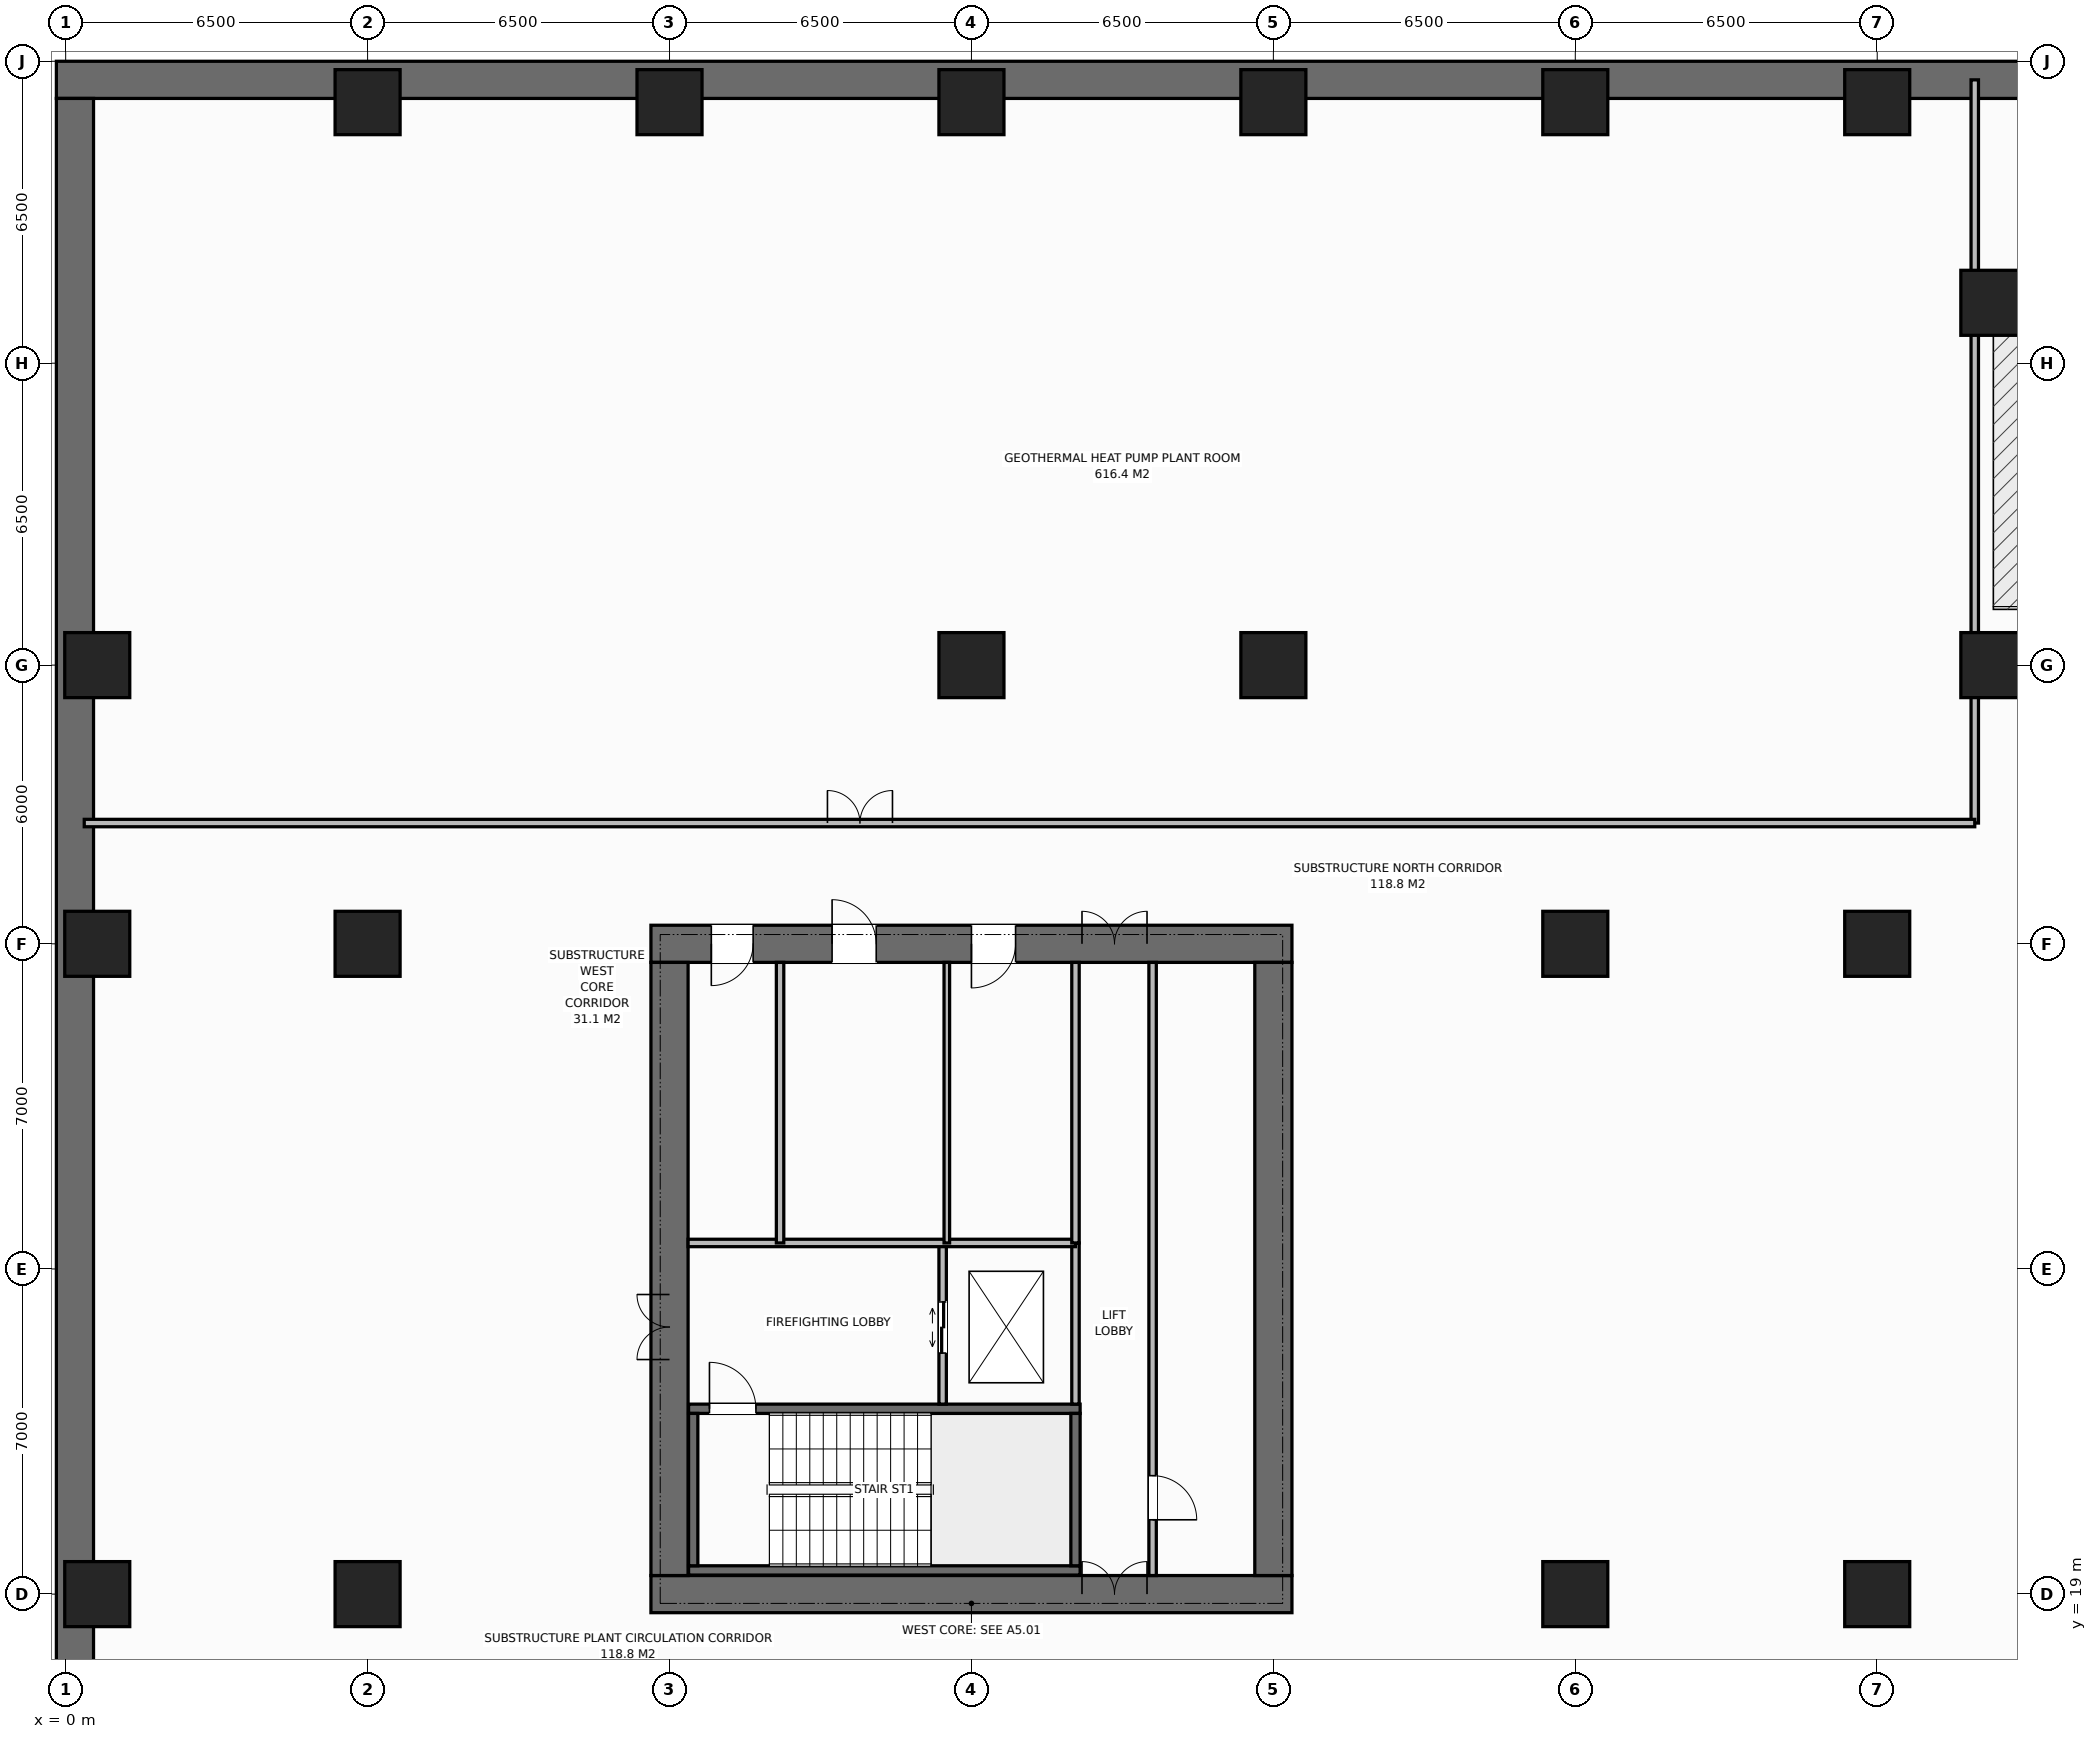
"""IFC4 building model, lengths in metres.
Left out: names, types, materials, properties, quantities, classifications, styles, units other than length and angle.
Written with IfcOpenShell. Run it as: python <this file> out.ifc"""

import sys

from ifc_helpers import new_model, si_unit, direction, frame, frame_2d, origin, origin_2d, place, context, subcontext, project, spatial, rectangle, extrude, element, fill, save


model = new_model("IFC4")
c1 = context("Model", 3, precision=1e-05, world=origin(), true_north=direction((0.0, 1.0)))
c2 = subcontext(c1, "Body", "Model", "MODEL_VIEW")
j1 = project(units=[si_unit("LENGTHUNIT", "METRE"), si_unit("PLANEANGLEUNIT", "RADIAN")], contexts=[c1])
p1 = place(None, origin())
s1 = spatial("IfcSite", under=j1, at=p1, CompositionType="ELEMENT")
p2 = place(p1, origin())
s2 = spatial("IfcBuilding", under=s1, at=p2, CompositionType="ELEMENT")
p3 = place(p2, frame((0.0, 0.0, -13.5)))
s3 = spatial("IfcBuildingStorey", under=s2, at=p3, CompositionType="ELEMENT", Elevation=-13.5)
p4 = place(p3, frame((78.2, 51.6, 0.0), z_axis=(0.0, 0.0, 1.0), x_axis=(-1.0, 0.0, 0.0)))
e1 = element("IfcWall", 1, at=p4, inside=s3, PredefinedType="USERDEFINED", context=c2, shape_type="SweptSolid", body=[
    extrude(rectangle(XDim=78.4, YDim=0.8, at=frame_2d((39.2, 0.0))), origin(), (0.0, 0.0, 1.0), 4.2),
])
p5 = place(p3, frame((0.2, 51.2, 0.0), z_axis=(0.0, 0.0, 1.0), x_axis=(0.0, -1.0, 0.0)))
e2 = element("IfcWall", 2, at=p5, inside=s3, PredefinedType="USERDEFINED", context=c2, shape_type="SweptSolid", body=[
    extrude(rectangle(XDim=50.4, YDim=0.8, at=frame_2d((25.2, 0.0))), origin(), (0.0, 0.0, 1.0), 4.2),
])
p6 = place(p3, frame((12.6, 19.0, 0.0), z_axis=(0.0, 0.0, 1.0), x_axis=(1.0, 0.0, 0.0)))
e3 = element("IfcWall", 3, at=p6, inside=s3, PredefinedType="SHEAR", context=c2, shape_type="SweptSolid", body=[
    extrude(rectangle(XDim=13.8, YDim=0.8, at=frame_2d((6.9, 0.0))), origin(), (0.0, 0.0, 1.0), 4.5),
])
p7 = place(p6, frame((9.28, 0.0, 0.0)))
e4 = element("IfcOpeningElement", 4, at=p7, cuts=e3, PredefinedType="OPENING", context=c2, shape_type="SweptSolid", body=[
    extrude(rectangle(XDim=1.4, YDim=2.2, at=frame_2d((0.7, 1.1))), frame((0.0, 0.41, 0.0), z_axis=(0.0, -1.0, 0.0), x_axis=(1.0, 0.0, 0.0)), (0.0, 0.0, 1.0), 0.82),
])
p8 = place(p3, frame((12.6, 33.0, 0.0), z_axis=(0.0, 0.0, 1.0), x_axis=(1.0, 0.0, 0.0)))
e5 = element("IfcWall", 5, at=p8, inside=s3, PredefinedType="SHEAR", context=c2, shape_type="SweptSolid", body=[
    extrude(rectangle(XDim=13.8, YDim=0.8, at=frame_2d((6.9, 0.0))), origin(), (0.0, 0.0, 1.0), 4.5),
])
p9 = place(p8, frame((1.3, 0.0, 0.0)))
e6 = element("IfcOpeningElement", 6, at=p9, cuts=e5, PredefinedType="OPENING", context=c2, shape_type="SweptSolid", body=[
    extrude(rectangle(XDim=0.9, YDim=2.15, at=frame_2d((0.45, 1.075))), frame((0.0, 0.41, 0.0), z_axis=(0.0, -1.0, 0.0), x_axis=(1.0, 0.0, 0.0)), (0.0, 0.0, 1.0), 0.82),
])
p10 = place(p8, frame((3.9, 0.0, 0.0)))
e7 = element("IfcOpeningElement", 7, at=p10, cuts=e5, PredefinedType="OPENING", context=c2, shape_type="SweptSolid", body=[
    extrude(rectangle(XDim=0.95, YDim=2.15, at=frame_2d((0.475, 1.075))), frame((0.0, 0.41, 0.0), z_axis=(0.0, -1.0, 0.0), x_axis=(1.0, 0.0, 0.0)), (0.0, 0.0, 1.0), 0.82),
])
p11 = place(p8, frame((6.9, 0.0, 0.0)))
e8 = element("IfcOpeningElement", 8, at=p11, cuts=e5, PredefinedType="OPENING", context=c2, shape_type="SweptSolid", body=[
    extrude(rectangle(XDim=0.95, YDim=2.15, at=frame_2d((0.475, 1.075))), frame((0.0, 0.41, 0.0), z_axis=(0.0, -1.0, 0.0), x_axis=(1.0, 0.0, 0.0)), (0.0, 0.0, 1.0), 0.82),
])
p12 = place(p8, frame((9.28, 0.0, 0.0)))
e9 = element("IfcOpeningElement", 9, at=p12, cuts=e5, PredefinedType="OPENING", context=c2, shape_type="SweptSolid", body=[
    extrude(rectangle(XDim=1.4, YDim=2.2, at=frame_2d((0.7, 1.1))), frame((0.0, 0.41, 0.0), z_axis=(0.0, -1.0, 0.0), x_axis=(1.0, 0.0, 0.0)), (0.0, 0.0, 1.0), 0.82),
])
p13 = place(p3, frame((13.0, 19.4, 0.0), z_axis=(0.0, 0.0, 1.0), x_axis=(0.0, 1.0, 0.0)))
e10 = element("IfcWall", 10, at=p13, inside=s3, PredefinedType="SHEAR", context=c2, shape_type="SweptSolid", body=[
    extrude(rectangle(XDim=13.2, YDim=0.8, at=frame_2d((6.6, 0.0))), origin(), (0.0, 0.0, 1.0), 4.5),
])
p14 = place(p13, frame((4.65, 0.0, 0.0)))
e11 = element("IfcOpeningElement", 11, at=p14, cuts=e10, PredefinedType="OPENING", context=c2, shape_type="SweptSolid", body=[
    extrude(rectangle(XDim=1.4, YDim=2.2, at=frame_2d((0.7, 1.1))), frame((0.0, 0.41, 0.0), z_axis=(0.0, -1.0, 0.0), x_axis=(1.0, 0.0, 0.0)), (0.0, 0.0, 1.0), 0.82),
])
p15 = place(p3, frame((26.0, 19.4, 0.0), z_axis=(0.0, 0.0, 1.0), x_axis=(0.0, 1.0, 0.0)))
e12 = element("IfcWall", 12, at=p15, inside=s3, PredefinedType="SHEAR", context=c2, shape_type="SweptSolid", body=[
    extrude(rectangle(XDim=13.2, YDim=0.8, at=frame_2d((6.6, 0.0))), origin(), (0.0, 0.0, 1.0), 4.5),
])
p16 = place(p3, frame((13.41, 19.51, 0.0), z_axis=(0.0, 0.0, 1.0), x_axis=(1.0, 0.0, 0.0)))
e13 = element("IfcWall", 13, at=p16, inside=s3, PredefinedType="SHEAR", context=c2, shape_type="SweptSolid", body=[
    extrude(rectangle(XDim=8.43, YDim=0.2, at=frame_2d((4.215, 0.0))), origin(), (0.0, 0.0, 1.0), 4.5),
])
p17 = place(p3, frame((13.41, 22.99, 0.0), z_axis=(0.0, 0.0, 1.0), x_axis=(1.0, 0.0, 0.0)))
e14 = element("IfcWall", 14, at=p17, inside=s3, PredefinedType="SHEAR", context=c2, shape_type="SweptSolid", body=[
    extrude(rectangle(XDim=8.43, YDim=0.2, at=frame_2d((4.215, 0.0))), origin(), (0.0, 0.0, 1.0), 4.5),
])
p18 = place(p17, frame((0.45, 0.0, 0.0)))
e15 = element("IfcOpeningElement", 15, at=p18, cuts=e14, PredefinedType="OPENING", context=c2, shape_type="SweptSolid", body=[
    extrude(rectangle(XDim=1.0, YDim=2.15, at=frame_2d((0.5, 1.075))), frame((0.0, 0.11, 0.0), z_axis=(0.0, -1.0, 0.0), x_axis=(1.0, 0.0, 0.0)), (0.0, 0.0, 1.0), 0.22),
])
for number, where, z_axis, x_axis in (
    (16, (13.51, 19.61, 0.0), (0.0, 0.0, 1.0), (0.0, 1.0, 0.0)),
    (17, (21.74, 19.61, 0.0), (0.0, 0.0, 1.0), (0.0, 1.0, 0.0)),
):
    element("IfcWall", number, at=place(p3, frame(where, z_axis=z_axis, x_axis=x_axis)), inside=s3, PredefinedType="SHEAR", context=c2, shape_type="SweptSolid", body=[
        extrude(rectangle(XDim=3.28, YDim=0.2, at=frame_2d((1.64, 0.0))), origin(), (0.0, 0.0, 1.0), 4.5),
    ])
for number, where, z_axis, x_axis in (
    (18, (19.5, 39.0, 0.0), (0.0, 0.0, 1.0), (1.0, 0.0, 0.0)),
    (19, (6.5, 19.0, 0.0), (0.0, 0.0, 1.0), (1.0, 0.0, 0.0)),
    (20, (6.5, 33.0, 0.0), (0.0, 0.0, 1.0), (1.0, 0.0, 0.0)),
    (21, (32.5, 19.0, 0.0), (0.0, 0.0, 1.0), (1.0, 0.0, 0.0)),
    (22, (32.5, 33.0, 0.0), (0.0, 0.0, 1.0), (1.0, 0.0, 0.0)),
    (23, (39.0, 19.0, 0.0), (0.0, 0.0, 1.0), (1.0, 0.0, 0.0)),
    (24, (39.0, 33.0, 0.0), (0.0, 0.0, 1.0), (1.0, 0.0, 0.0)),
    (25, (41.5, 39.0, 0.0), (0.0, 0.0, 1.0), (1.0, 0.0, 0.0)),
    (26, (41.5, 46.8, 0.0), (0.0, 0.0, 1.0), (1.0, 0.0, 0.0)),
    (27, (26.0, 39.0, 0.0), (0.0, 0.0, 1.0), (1.0, 0.0, 0.0)),
    (28, (6.5, 51.12, 0.0), (0.0, 0.0, 1.0), (1.0, 0.0, 0.0)),
    (29, (13.0, 51.12, 0.0), (0.0, 0.0, 1.0), (1.0, 0.0, 0.0)),
    (30, (19.5, 51.12, 0.0), (0.0, 0.0, 1.0), (1.0, 0.0, 0.0)),
    (31, (26.0, 51.12, 0.0), (0.0, 0.0, 1.0), (1.0, 0.0, 0.0)),
    (32, (32.5, 51.12, 0.0), (0.0, 0.0, 1.0), (1.0, 0.0, 0.0)),
    (33, (39.0, 51.12, 0.0), (0.0, 0.0, 1.0), (1.0, 0.0, 0.0)),
    (34, (0.68, 19.0, 0.0), (0.0, 0.0, 1.0), (1.0, 0.0, 0.0)),
    (35, (0.68, 33.0, 0.0), (0.0, 0.0, 1.0), (1.0, 0.0, 0.0)),
    (36, (0.68, 39.0, 0.0), (0.0, 0.0, 1.0), (1.0, 0.0, 0.0)),
):
    element("IfcColumn", number, at=place(p3, frame(where, z_axis=z_axis, x_axis=x_axis)), inside=s3, PredefinedType="COLUMN", context=c2, shape_type="SweptSolid", body=[
        extrude(rectangle(XDim=1.4, YDim=1.4, at=origin_2d()), origin(), (0.0, 0.0, 1.0), 4.5),
    ])
p19 = place(p3, frame((21.74, 23.09, 0.0), z_axis=(0.0, 0.0, 1.0), x_axis=(0.0, 1.0, 0.0)))
e37 = element("IfcWall", 37, at=p19, inside=s3, PredefinedType="STANDARD", context=c2, shape_type="SweptSolid", body=[
    extrude(rectangle(XDim=3.47, YDim=0.16, at=frame_2d((1.735, 0.0))), origin(), (0.0, 0.0, 1.0), 4.2),
])
p20 = place(p3, frame((18.88, 23.09, 0.0), z_axis=(0.0, 0.0, 1.0), x_axis=(0.0, 1.0, 0.0)))
e38 = element("IfcWall", 38, at=p20, inside=s3, PredefinedType="STANDARD", context=c2, shape_type="SweptSolid", body=[
    extrude(rectangle(XDim=3.47, YDim=0.16, at=frame_2d((1.735, 0.0))), origin(), (0.0, 0.0, 1.0), 4.2),
])
p21 = place(p20, frame((1.1, 0.0, 0.0)))
e39 = element("IfcOpeningElement", 39, at=p21, cuts=e38, PredefinedType="OPENING", context=c2, shape_type="SweptSolid", body=[
    extrude(rectangle(XDim=1.1, YDim=2.2, at=frame_2d((0.55, 1.1))), frame((0.0, 0.09, 0.0), z_axis=(0.0, -1.0, 0.0), x_axis=(1.0, 0.0, 0.0)), (0.0, 0.0, 1.0), 0.18),
])
p22 = place(p3, frame((13.4, 26.56, 0.0), z_axis=(0.0, 0.0, 1.0), x_axis=(1.0, 0.0, 0.0)))
e40 = element("IfcWall", 40, at=p22, inside=s3, PredefinedType="STANDARD", context=c2, shape_type="SweptSolid", body=[
    extrude(rectangle(XDim=8.34, YDim=0.16, at=frame_2d((4.17, 0.0))), origin(), (0.0, 0.0, 1.0), 4.2),
])
p23 = place(p3, frame((15.38, 26.56, 0.0), z_axis=(0.0, 0.0, 1.0), x_axis=(0.0, 1.0, 0.0)))
e41 = element("IfcWall", 41, at=p23, inside=s3, PredefinedType="STANDARD", context=c2, shape_type="SweptSolid", body=[
    extrude(rectangle(XDim=6.04, YDim=0.16, at=frame_2d((3.02, 0.0))), origin(), (0.0, 0.0, 1.0), 4.2),
])
p24 = place(p3, frame((18.97, 26.56, 0.0), z_axis=(0.0, 0.0, 1.0), x_axis=(0.0, 1.0, 0.0)))
e42 = element("IfcWall", 42, at=p24, inside=s3, PredefinedType="PARTITIONING", context=c2, shape_type="SweptSolid", body=[
    extrude(rectangle(XDim=6.04, YDim=0.12, at=frame_2d((3.02, 0.0))), origin(), (0.0, 0.0, 1.0), 4.2),
])
p25 = place(p3, frame((21.74, 26.56, 0.0), z_axis=(0.0, 0.0, 1.0), x_axis=(0.0, 1.0, 0.0)))
e43 = element("IfcWall", 43, at=p25, inside=s3, PredefinedType="STANDARD", context=c2, shape_type="SweptSolid", body=[
    extrude(rectangle(XDim=6.04, YDim=0.16, at=frame_2d((3.02, 0.0))), origin(), (0.0, 0.0, 1.0), 4.2),
])
p26 = place(p3, frame((23.4, 19.4, 0.0), z_axis=(0.0, 0.0, 1.0), x_axis=(0.0, 1.0, 0.0)))
e44 = element("IfcWall", 44, at=p26, inside=s3, PredefinedType="STANDARD", context=c2, shape_type="SweptSolid", body=[
    extrude(rectangle(XDim=13.2, YDim=0.16, at=frame_2d((6.6, 0.0))), origin(), (0.0, 0.0, 1.0), 4.2),
])
p27 = place(p26, frame((1.2, 0.0, 0.0)))
e45 = element("IfcOpeningElement", 45, at=p27, cuts=e44, PredefinedType="OPENING", context=c2, shape_type="SweptSolid", body=[
    extrude(rectangle(XDim=0.95, YDim=2.15, at=frame_2d((0.475, 1.075))), frame((0.0, 0.09, 0.0), z_axis=(0.0, -1.0, 0.0), x_axis=(1.0, 0.0, 0.0)), (0.0, 0.0, 1.0), 0.18),
])
p28 = place(p3, frame((41.1, 35.6, 0.0), z_axis=(0.0, 0.0, 1.0), x_axis=(0.0, 1.0, 0.0)))
e46 = element("IfcWall", 46, at=p28, inside=s3, PredefinedType="STANDARD", context=c2, shape_type="SweptSolid", body=[
    extrude(rectangle(XDim=16.0, YDim=0.16, at=frame_2d((8.0, 0.0))), origin(), (0.0, 0.0, 1.0), 4.2),
])
p29 = place(p3, frame((0.4, 35.6, 0.0), z_axis=(0.0, 0.0, 1.0), x_axis=(1.0, 0.0, 0.0)))
e47 = element("IfcWall", 47, at=p29, inside=s3, PredefinedType="STANDARD", context=c2, shape_type="SweptSolid", body=[
    extrude(rectangle(XDim=40.7, YDim=0.16, at=frame_2d((20.35, 0.0))), origin(), (0.0, 0.0, 1.0), 4.2),
])
p30 = place(p29, frame((16.0, 0.0, 0.0)))
e48 = element("IfcOpeningElement", 48, at=p30, cuts=e47, PredefinedType="OPENING", context=c2, shape_type="SweptSolid", body=[
    extrude(rectangle(XDim=1.4, YDim=2.2, at=frame_2d((0.7, 1.1))), frame((0.0, 0.09, 0.0), z_axis=(0.0, -1.0, 0.0), x_axis=(1.0, 0.0, 0.0)), (0.0, 0.0, 1.0), 0.18),
])
p31 = place(p18, origin())
e49 = element("IfcDoor", 49, at=p31, inside=s3, OperationType="SINGLE_SWING_LEFT", PredefinedType="DOOR", context=c2, shape_type="SweptSolid", body=[
    extrude(rectangle(XDim=1.0, YDim=2.15, at=frame_2d((0.5, 1.075))), frame((0.0, 0.025, 0.0), z_axis=(0.0, -1.0, 0.0), x_axis=(1.0, 0.0, 0.0)), (0.0, 0.0, 1.0), 0.05),
])
fill(e15, e49)
p32 = place(p14, origin())
e50 = element("IfcDoor", 50, at=p32, inside=s3, OperationType="DOUBLE_DOOR_SINGLE_SWING", PredefinedType="DOOR", context=c2, shape_type="SweptSolid", body=[
    extrude(rectangle(XDim=1.4, YDim=2.2, at=frame_2d((0.7, 1.1))), frame((0.0, 0.025, 0.0), z_axis=(0.0, -1.0, 0.0), x_axis=(1.0, 0.0, 0.0)), (0.0, 0.0, 1.0), 0.05),
])
fill(e11, e50)
p33 = place(p21, origin())
e51 = element("IfcDoor", 51, at=p33, inside=s3, OperationType="DOUBLE_DOOR_SLIDING", PredefinedType="DOOR", context=c2, shape_type="SweptSolid", body=[
    extrude(rectangle(XDim=1.1, YDim=2.2, at=frame_2d((0.55, 1.1))), frame((0.0, 0.025, 0.0), z_axis=(0.0, -1.0, 0.0), x_axis=(1.0, 0.0, 0.0)), (0.0, 0.0, 1.0), 0.05),
])
fill(e39, e51)
p34 = place(p9, origin())
e52 = element("IfcDoor", 52, at=p34, inside=s3, OperationType="SINGLE_SWING_RIGHT", PredefinedType="DOOR", context=c2, shape_type="SweptSolid", body=[
    extrude(rectangle(XDim=0.9, YDim=2.15, at=frame_2d((0.45, 1.075))), frame((0.0, -0.075, 0.0), z_axis=(0.0, -1.0, 0.0), x_axis=(1.0, 0.0, 0.0)), (0.0, 0.0, 1.0), 0.05),
])
fill(e6, e52)
p35 = place(p10, origin())
e53 = element("IfcDoor", 53, at=p35, inside=s3, OperationType="SINGLE_SWING_LEFT", PredefinedType="DOOR", context=c2, shape_type="SweptSolid", body=[
    extrude(rectangle(XDim=0.95, YDim=2.15, at=frame_2d((0.475, 1.075))), frame((0.0, -0.075, 0.0), z_axis=(0.0, -1.0, 0.0), x_axis=(1.0, 0.0, 0.0)), (0.0, 0.0, 1.0), 0.05),
])
fill(e7, e53)
p36 = place(p11, origin())
e54 = element("IfcDoor", 54, at=p36, inside=s3, OperationType="SINGLE_SWING_RIGHT", PredefinedType="DOOR", context=c2, shape_type="SweptSolid", body=[
    extrude(rectangle(XDim=0.95, YDim=2.15, at=frame_2d((0.475, 1.075))), frame((0.0, -0.075, 0.0), z_axis=(0.0, -1.0, 0.0), x_axis=(1.0, 0.0, 0.0)), (0.0, 0.0, 1.0), 0.05),
])
fill(e8, e54)
p37 = place(p7, origin())
e55 = element("IfcDoor", 55, at=p37, inside=s3, OperationType="DOUBLE_DOOR_SINGLE_SWING", PredefinedType="DOOR", context=c2, shape_type="SweptSolid", body=[
    extrude(rectangle(XDim=1.4, YDim=2.2, at=frame_2d((0.7, 1.1))), frame((0.0, 0.125, 0.0), z_axis=(0.0, -1.0, 0.0), x_axis=(1.0, 0.0, 0.0)), (0.0, 0.0, 1.0), 0.05),
])
fill(e4, e55)
p38 = place(p12, origin())
e56 = element("IfcDoor", 56, at=p38, inside=s3, OperationType="DOUBLE_DOOR_SINGLE_SWING", PredefinedType="DOOR", context=c2, shape_type="SweptSolid", body=[
    extrude(rectangle(XDim=1.4, YDim=2.2, at=frame_2d((0.7, 1.1))), frame((0.0, -0.075, 0.0), z_axis=(0.0, -1.0, 0.0), x_axis=(1.0, 0.0, 0.0)), (0.0, 0.0, 1.0), 0.05),
])
fill(e9, e56)
p39 = place(p27, origin())
e57 = element("IfcDoor", 57, at=p39, inside=s3, OperationType="SINGLE_SWING_RIGHT", PredefinedType="DOOR", context=c2, shape_type="SweptSolid", body=[
    extrude(rectangle(XDim=0.95, YDim=2.15, at=frame_2d((0.475, 1.075))), frame((0.0, 0.025, 0.0), z_axis=(0.0, -1.0, 0.0), x_axis=(1.0, 0.0, 0.0)), (0.0, 0.0, 1.0), 0.05),
])
fill(e45, e57)
p40 = place(p30, origin())
e58 = element("IfcDoor", 58, at=p40, inside=s3, OperationType="DOUBLE_DOOR_SINGLE_SWING", PredefinedType="DOOR", context=c2, shape_type="SweptSolid", body=[
    extrude(rectangle(XDim=1.4, YDim=2.2, at=frame_2d((0.7, 1.1))), frame((0.0, 0.025, 0.0), z_axis=(0.0, -1.0, 0.0), x_axis=(1.0, 0.0, 0.0)), (0.0, 0.0, 1.0), 0.05),
])
fill(e48, e58)
save(model, sys.argv[1])
